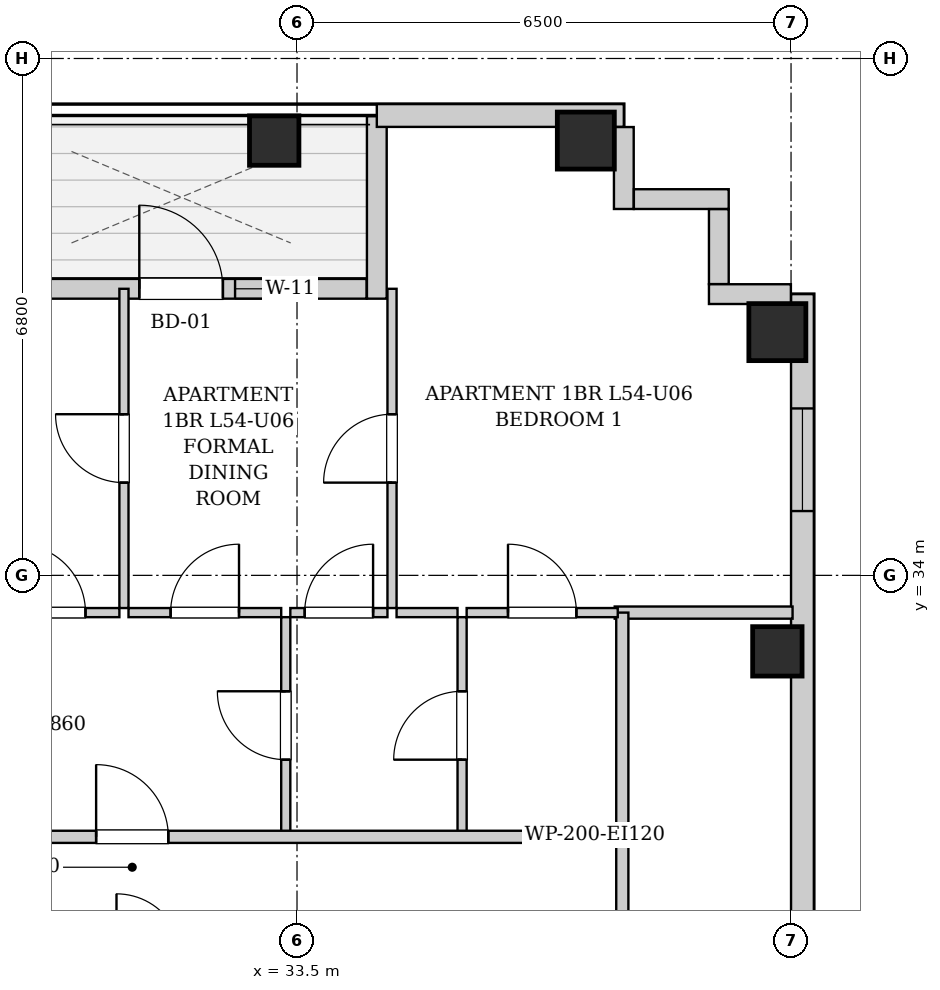
"""IFC4 building model, lengths in metres.
Left out: names, types, materials, properties, quantities, classifications, styles, units other than length and angle.
Written with IfcOpenShell. Run it as: python <this file> out.ifc"""

import sys

from ifc_helpers import new_model, si_unit, direction, frame, frame_2d, origin, origin_2d, place, context, subcontext, project, spatial, rectangle, extrude, element, fill, save


model = new_model("IFC4")
c1 = context("Model", 3, precision=1e-05, world=origin(), true_north=direction((0.0, 1.0)))
c2 = subcontext(c1, "Body", "Model", "MODEL_VIEW")
j1 = project(units=[si_unit("LENGTHUNIT", "METRE"), si_unit("PLANEANGLEUNIT", "RADIAN")], contexts=[c1])
p1 = place(None, origin())
s1 = spatial("IfcSite", under=j1, at=p1, CompositionType="ELEMENT")
p2 = place(p1, origin())
s2 = spatial("IfcBuilding", under=s1, at=p2, CompositionType="ELEMENT")
p3 = place(p2, frame((0.0, 0.0, 187.6)))
s3 = spatial("IfcBuildingStorey", under=s2, at=p3, CompositionType="ELEMENT", Elevation=187.6)
p4 = place(p3, frame((33.2, 39.72, 0.0), z_axis=(0.0, 0.0, 1.0), x_axis=(1.0, 0.0, 0.0)))
e1 = element("IfcColumn", 1, at=p4, inside=s3, PredefinedType="COLUMN", context=c2, shape_type="SweptSolid", body=[
    extrude(rectangle(XDim=0.65, YDim=0.65, at=origin_2d()), origin(), (0.0, 0.0, 1.0), 3.3),
])
p5 = place(p3, frame((37.3, 39.72, 0.0), z_axis=(0.0, 0.0, 1.0), x_axis=(1.0, 0.0, 0.0)))
e2 = element("IfcColumn", 2, at=p5, inside=s3, PredefinedType="COLUMN", context=c2, shape_type="SweptSolid", body=[
    extrude(rectangle(XDim=0.75, YDim=0.75, at=origin_2d()), origin(), (0.0, 0.0, 1.0), 3.3),
])
p6 = place(p3, frame((39.82, 33.0, 0.0), z_axis=(0.0, 0.0, 1.0), x_axis=(1.0, 0.0, 0.0)))
e3 = element("IfcColumn", 3, at=p6, inside=s3, PredefinedType="COLUMN", context=c2, shape_type="SweptSolid", body=[
    extrude(rectangle(XDim=0.65, YDim=0.65, at=origin_2d()), origin(), (0.0, 0.0, 1.0), 3.3),
])
p7 = place(p3, frame((39.82, 37.2, 0.0), z_axis=(0.0, 0.0, 1.0), x_axis=(1.0, 0.0, 0.0)))
e4 = element("IfcColumn", 4, at=p7, inside=s3, PredefinedType="COLUMN", context=c2, shape_type="SweptSolid", body=[
    extrude(rectangle(XDim=0.75, YDim=0.75, at=origin_2d()), origin(), (0.0, 0.0, 1.0), 3.3),
])
p8 = place(p3, frame((29.534, 37.77, 0.0), z_axis=(0.0, 0.0, 1.0), x_axis=(1.0, 0.0, 0.0)))
e5 = element("IfcWall", 5, at=p8, inside=s3, PredefinedType="SOLIDWALL", context=c2, shape_type="SweptSolid", body=[
    extrude(rectangle(XDim=4.882, YDim=0.26, at=frame_2d((2.441, 0.0))), origin(), (0.0, 0.0, 1.0), 3.04),
])
p9 = place(p8, frame((1.891, 0.0, 0.0)))
e6 = element("IfcOpeningElement", 6, at=p9, cuts=e5, PredefinedType="OPENING", context=c2, shape_type="SweptSolid", body=[
    extrude(rectangle(XDim=1.1, YDim=2.0, at=frame_2d((0.55, 1.0))), frame((0.0, 0.14, 0.0), z_axis=(0.0, -1.0, 0.0), x_axis=(1.0, 0.0, 0.0)), (0.0, 0.0, 1.0), 0.28),
])
p10 = place(p8, frame((3.151, 0.0, 0.55)))
e7 = element("IfcOpeningElement", 7, at=p10, cuts=e5, PredefinedType="OPENING", context=c2, shape_type="SweptSolid", body=[
    extrude(rectangle(XDim=0.85, YDim=1.2, at=frame_2d((0.425, 0.6))), frame((0.0, 0.14, 0.0), z_axis=(0.0, -1.0, 0.0), x_axis=(1.0, 0.0, 0.0)), (0.0, 0.0, 1.0), 0.28),
])
p11 = place(p3, frame((34.55, 37.64, 0.0), z_axis=(0.0, 0.0, 1.0), x_axis=(0.0, 1.0, 0.0)))
e8 = element("IfcWall", 8, at=p11, inside=s3, PredefinedType="SOLIDWALL", context=c2, shape_type="SweptSolid", body=[
    extrude(rectangle(XDim=2.4, YDim=0.26, at=frame_2d((1.2, 0.0))), origin(), (0.0, 0.0, 1.0), 3.04),
])
p12 = place(p3, frame((34.55, 40.05, 0.0), z_axis=(0.0, 0.0, 1.0), x_axis=(1.0, 0.0, 0.0)))
e9 = element("IfcWall", 9, at=p12, inside=s3, PredefinedType="SOLIDWALL", context=c2, shape_type="SweptSolid", body=[
    extrude(rectangle(XDim=3.25, YDim=0.3, at=frame_2d((1.625, 0.0))), origin(), (0.0, 0.0, 1.0), 3.04),
])
p13 = place(p3, frame((40.15, 37.7, 0.0), z_axis=(0.0, 0.0, 1.0), x_axis=(0.0, -1.0, 0.0)))
e10 = element("IfcWall", 10, at=p13, inside=s3, PredefinedType="SOLIDWALL", context=c2, shape_type="SweptSolid", body=[
    extrude(rectangle(XDim=31.4, YDim=0.3, at=frame_2d((15.7, 0.0))), origin(), (0.0, 0.0, 1.0), 3.04),
])
p14 = place(p13, frame((1.504, 0.0, 0.55)))
e11 = element("IfcOpeningElement", 11, at=p14, cuts=e10, PredefinedType="OPENING", context=c2, shape_type="SweptSolid", body=[
    extrude(rectangle(XDim=1.35, YDim=1.2, at=frame_2d((0.675, 0.6))), frame((0.0, 0.16, 0.0), z_axis=(0.0, -1.0, 0.0), x_axis=(1.0, 0.0, 0.0)), (0.0, 0.0, 1.0), 0.32),
])
p15 = place(p13, frame((18.2, 0.0, 0.55)))
e12 = element("IfcOpeningElement", 12, at=p15, cuts=e10, PredefinedType="OPENING", context=c2, shape_type="SweptSolid", body=[
    extrude(rectangle(XDim=1.35, YDim=1.2, at=frame_2d((0.675, 0.6))), frame((0.0, 0.16, 0.0), z_axis=(0.0, -1.0, 0.0), x_axis=(1.0, 0.0, 0.0)), (0.0, 0.0, 1.0), 0.32),
])
p16 = place(p13, frame((19.81, 0.0, 0.55)))
e13 = element("IfcOpeningElement", 13, at=p16, cuts=e10, PredefinedType="OPENING", context=c2, shape_type="SweptSolid", body=[
    extrude(rectangle(XDim=1.35, YDim=1.2, at=frame_2d((0.675, 0.6))), frame((0.0, 0.16, 0.0), z_axis=(0.0, -1.0, 0.0), x_axis=(1.0, 0.0, 0.0)), (0.0, 0.0, 1.0), 0.32),
])
p17 = place(p13, frame((11.043, 0.0, 0.55)))
e14 = element("IfcOpeningElement", 14, at=p17, cuts=e10, PredefinedType="OPENING", context=c2, shape_type="SweptSolid", body=[
    extrude(rectangle(XDim=1.35, YDim=1.2, at=frame_2d((0.675, 0.6))), frame((0.0, 0.16, 0.0), z_axis=(0.0, -1.0, 0.0), x_axis=(1.0, 0.0, 0.0)), (0.0, 0.0, 1.0), 0.32),
])
p18 = place(p13, frame((9.185, 0.0, 0.55)))
e15 = element("IfcOpeningElement", 15, at=p18, cuts=e10, PredefinedType="OPENING", context=c2, shape_type="SweptSolid", body=[
    extrude(rectangle(XDim=1.35, YDim=1.2, at=frame_2d((0.675, 0.6))), frame((0.0, 0.16, 0.0), z_axis=(0.0, -1.0, 0.0), x_axis=(1.0, 0.0, 0.0)), (0.0, 0.0, 1.0), 0.32),
])
p19 = place(p3, frame((37.8, 39.898, 0.0), z_axis=(0.0, 0.0, 1.0), x_axis=(0.0, -1.0, 0.0)))
e16 = element("IfcWall", 16, at=p19, inside=s3, PredefinedType="SOLIDWALL", context=c2, shape_type="SweptSolid", body=[
    extrude(rectangle(XDim=1.078, YDim=0.26, at=frame_2d((0.539, 0.0))), origin(), (0.0, 0.0, 1.0), 3.04),
])
p20 = place(p3, frame((37.932, 38.95, 0.0), z_axis=(0.0, 0.0, 1.0), x_axis=(1.0, 0.0, 0.0)))
e17 = element("IfcWall", 17, at=p20, inside=s3, PredefinedType="SOLIDWALL", context=c2, shape_type="SweptSolid", body=[
    extrude(rectangle(XDim=1.248, YDim=0.26, at=frame_2d((0.624, 0.0))), origin(), (0.0, 0.0, 1.0), 3.04),
])
p21 = place(p3, frame((39.05, 38.818, 0.0), z_axis=(0.0, 0.0, 1.0), x_axis=(0.0, -1.0, 0.0)))
e18 = element("IfcWall", 18, at=p21, inside=s3, PredefinedType="SOLIDWALL", context=c2, shape_type="SweptSolid", body=[
    extrude(rectangle(XDim=0.986, YDim=0.26, at=frame_2d((0.493, 0.0))), origin(), (0.0, 0.0, 1.0), 3.04),
])
p22 = place(p3, frame((38.92, 37.7, 0.0), z_axis=(0.0, 0.0, 1.0), x_axis=(1.0, 0.0, 0.0)))
e19 = element("IfcWall", 19, at=p22, inside=s3, PredefinedType="SOLIDWALL", context=c2, shape_type="SweptSolid", body=[
    extrude(rectangle(XDim=1.078, YDim=0.26, at=frame_2d((0.539, 0.0))), origin(), (0.0, 0.0, 1.0), 3.04),
])
p23 = place(p3, frame((37.78, 28.98, 0.0), z_axis=(0.0, 0.0, 1.0), x_axis=(0.0, 1.0, 0.0)))
e20 = element("IfcWall", 20, at=p23, inside=s3, PredefinedType="PARTITIONING", context=c2, shape_type="SweptSolid", body=[
    extrude(rectangle(XDim=1.58, YDim=0.16, at=frame_2d((0.79, 0.0))), origin(), (0.0, 0.0, 1.0), 3.04),
])
p24 = place(p3, frame((37.68, 33.51, 0.0), z_axis=(0.0, 0.0, 1.0), x_axis=(1.0, 0.0, 0.0)))
e21 = element("IfcWall", 21, at=p24, inside=s3, PredefinedType="PARTITIONING", context=c2, shape_type="SweptSolid", body=[
    extrude(rectangle(XDim=2.34, YDim=0.16, at=frame_2d((1.17, 0.0))), origin(), (0.0, 0.0, 1.0), 3.04),
])
p25 = place(p3, frame((37.78, 30.6, 0.0), z_axis=(0.0, 0.0, 1.0), x_axis=(0.0, 1.0, 0.0)))
e22 = element("IfcWall", 22, at=p25, inside=s3, PredefinedType="PARTITIONING", context=c2, shape_type="SweptSolid", body=[
    extrude(rectangle(XDim=2.91, YDim=0.16, at=frame_2d((1.455, 0.0))), origin(), (0.0, 0.0, 1.0), 3.04),
])
p26 = place(p3, frame((33.352, 30.6, 0.0), z_axis=(0.0, 0.0, 1.0), x_axis=(0.0, 1.0, 0.0)))
e23 = element("IfcWall", 23, at=p26, inside=s3, PredefinedType="PARTITIONING", context=c2, shape_type="SweptSolid", body=[
    extrude(rectangle(XDim=2.85, YDim=0.12, at=frame_2d((1.425, 0.0))), origin(), (0.0, 0.0, 1.0), 3.04),
])
p27 = place(p26, frame((0.975, 0.0, 0.0)))
e24 = element("IfcOpeningElement", 24, at=p27, cuts=e23, PredefinedType="OPENING", context=c2, shape_type="SweptSolid", body=[
    extrude(rectangle(XDim=0.9, YDim=2.05, at=frame_2d((0.45, 1.025))), frame((0.0, 0.07, 0.0), z_axis=(0.0, -1.0, 0.0), x_axis=(1.0, 0.0, 0.0)), (0.0, 0.0, 1.0), 0.14),
])
p28 = place(p3, frame((29.372, 33.51, 0.0), z_axis=(0.0, 0.0, 1.0), x_axis=(1.0, 0.0, 0.0)))
e25 = element("IfcWall", 25, at=p28, inside=s3, PredefinedType="PARTITIONING", context=c2, shape_type="SweptSolid", body=[
    extrude(rectangle(XDim=1.791, YDim=0.12, at=frame_2d((0.896, 0.0))), origin(), (0.0, 0.0, 1.0), 3.04),
])
p29 = place(p28, frame((0.445, 0.0, 0.0)))
e26 = element("IfcOpeningElement", 26, at=p29, cuts=e25, PredefinedType="OPENING", context=c2, shape_type="SweptSolid", body=[
    extrude(rectangle(XDim=0.9, YDim=2.05, at=frame_2d((0.45, 1.025))), frame((0.0, 0.07, 0.0), z_axis=(0.0, -1.0, 0.0), x_axis=(1.0, 0.0, 0.0)), (0.0, 0.0, 1.0), 0.14),
])
p30 = place(p3, frame((31.283, 33.51, 0.0), z_axis=(0.0, 0.0, 1.0), x_axis=(1.0, 0.0, 0.0)))
e27 = element("IfcWall", 27, at=p30, inside=s3, PredefinedType="PARTITIONING", context=c2, shape_type="SweptSolid", body=[
    extrude(rectangle(XDim=2.009, YDim=0.12, at=frame_2d((1.004, 0.0))), origin(), (0.0, 0.0, 1.0), 3.04),
])
p31 = place(p30, frame((0.554, 0.0, 0.0)))
e28 = element("IfcOpeningElement", 28, at=p31, cuts=e27, PredefinedType="OPENING", context=c2, shape_type="SweptSolid", body=[
    extrude(rectangle(XDim=0.9, YDim=2.05, at=frame_2d((0.45, 1.025))), frame((0.0, 0.07, 0.0), z_axis=(0.0, -1.0, 0.0), x_axis=(1.0, 0.0, 0.0)), (0.0, 0.0, 1.0), 0.14),
])
p32 = place(p3, frame((35.672, 30.6, 0.0), z_axis=(0.0, 0.0, 1.0), x_axis=(0.0, 1.0, 0.0)))
e29 = element("IfcWall", 29, at=p32, inside=s3, PredefinedType="PARTITIONING", context=c2, shape_type="SweptSolid", body=[
    extrude(rectangle(XDim=2.85, YDim=0.12, at=frame_2d((1.425, 0.0))), origin(), (0.0, 0.0, 1.0), 3.04),
])
p33 = place(p32, frame((0.975, 0.0, 0.0)))
e30 = element("IfcOpeningElement", 30, at=p33, cuts=e29, PredefinedType="OPENING", context=c2, shape_type="SweptSolid", body=[
    extrude(rectangle(XDim=0.9, YDim=2.05, at=frame_2d((0.45, 1.025))), frame((0.0, 0.07, 0.0), z_axis=(0.0, -1.0, 0.0), x_axis=(1.0, 0.0, 0.0)), (0.0, 0.0, 1.0), 0.14),
])
p34 = place(p3, frame((33.412, 33.51, 0.0), z_axis=(0.0, 0.0, 1.0), x_axis=(1.0, 0.0, 0.0)))
e31 = element("IfcWall", 31, at=p34, inside=s3, PredefinedType="PARTITIONING", context=c2, shape_type="SweptSolid", body=[
    extrude(rectangle(XDim=1.278, YDim=0.12, at=frame_2d((0.639, 0.0))), origin(), (0.0, 0.0, 1.0), 3.04),
])
p35 = place(p34, frame((0.189, 0.0, 0.0)))
e32 = element("IfcOpeningElement", 32, at=p35, cuts=e31, PredefinedType="OPENING", context=c2, shape_type="SweptSolid", body=[
    extrude(rectangle(XDim=0.9, YDim=2.05, at=frame_2d((0.45, 1.025))), frame((0.0, 0.07, 0.0), z_axis=(0.0, -1.0, 0.0), x_axis=(1.0, 0.0, 0.0)), (0.0, 0.0, 1.0), 0.14),
])
p36 = place(p3, frame((34.81, 33.51, 0.0), z_axis=(0.0, 0.0, 1.0), x_axis=(1.0, 0.0, 0.0)))
e33 = element("IfcWall", 33, at=p36, inside=s3, PredefinedType="PARTITIONING", context=c2, shape_type="SweptSolid", body=[
    extrude(rectangle(XDim=0.802, YDim=0.12, at=frame_2d((0.401, 0.0))), origin(), (0.0, 0.0, 1.0), 3.04),
])
p37 = place(p3, frame((35.732, 33.51, 0.0), z_axis=(0.0, 0.0, 1.0), x_axis=(1.0, 0.0, 0.0)))
e34 = element("IfcWall", 34, at=p37, inside=s3, PredefinedType="PARTITIONING", context=c2, shape_type="SweptSolid", body=[
    extrude(rectangle(XDim=1.988, YDim=0.12, at=frame_2d((0.994, 0.0))), origin(), (0.0, 0.0, 1.0), 3.04),
])
p38 = place(p37, frame((0.544, 0.0, 0.0)))
e35 = element("IfcOpeningElement", 35, at=p38, cuts=e34, PredefinedType="OPENING", context=c2, shape_type="SweptSolid", body=[
    extrude(rectangle(XDim=0.9, YDim=2.05, at=frame_2d((0.45, 1.025))), frame((0.0, 0.07, 0.0), z_axis=(0.0, -1.0, 0.0), x_axis=(1.0, 0.0, 0.0)), (0.0, 0.0, 1.0), 0.14),
])
p39 = place(p3, frame((31.223, 33.57, 0.0), z_axis=(0.0, 0.0, 1.0), x_axis=(0.0, 1.0, 0.0)))
e36 = element("IfcWall", 36, at=p39, inside=s3, PredefinedType="PARTITIONING", context=c2, shape_type="SweptSolid", body=[
    extrude(rectangle(XDim=4.2, YDim=0.12, at=frame_2d((2.1, 0.0))), origin(), (0.0, 0.0, 1.0), 3.04),
])
p40 = place(p39, frame((1.65, 0.0, 0.0)))
e37 = element("IfcOpeningElement", 37, at=p40, cuts=e36, PredefinedType="OPENING", context=c2, shape_type="SweptSolid", body=[
    extrude(rectangle(XDim=0.9, YDim=2.05, at=frame_2d((0.45, 1.025))), frame((0.0, 0.07, 0.0), z_axis=(0.0, -1.0, 0.0), x_axis=(1.0, 0.0, 0.0)), (0.0, 0.0, 1.0), 0.14),
])
p41 = place(p3, frame((34.75, 33.57, 0.0), z_axis=(0.0, 0.0, 1.0), x_axis=(0.0, 1.0, 0.0)))
e38 = element("IfcWall", 38, at=p41, inside=s3, PredefinedType="PARTITIONING", context=c2, shape_type="SweptSolid", body=[
    extrude(rectangle(XDim=4.2, YDim=0.12, at=frame_2d((2.1, 0.0))), origin(), (0.0, 0.0, 1.0), 3.04),
])
p42 = place(p41, frame((1.65, 0.0, 0.0)))
e39 = element("IfcOpeningElement", 39, at=p42, cuts=e38, PredefinedType="OPENING", context=c2, shape_type="SweptSolid", body=[
    extrude(rectangle(XDim=0.9, YDim=2.05, at=frame_2d((0.45, 1.025))), frame((0.0, 0.07, 0.0), z_axis=(0.0, -1.0, 0.0), x_axis=(1.0, 0.0, 0.0)), (0.0, 0.0, 1.0), 0.14),
])
p43 = place(p3, frame((13.15, 30.56, 0.0), z_axis=(0.0, 0.0, 1.0), x_axis=(1.0, 0.0, 0.0)))
e40 = element("IfcWall", 40, at=p43, inside=s3, PredefinedType="PARTITIONING", context=c2, shape_type="SweptSolid", body=[
    extrude(rectangle(XDim=24.6, YDim=0.16, at=frame_2d((12.3, 0.0))), origin(), (0.0, 0.0, 1.0), 3.04),
])
p44 = place(p43, frame((3.115, 0.0, 0.0)))
e41 = element("IfcOpeningElement", 41, at=p44, cuts=e40, PredefinedType="OPENING", context=c2, shape_type="SweptSolid", body=[
    extrude(rectangle(XDim=0.95, YDim=2.1, at=frame_2d((0.475, 1.05))), frame((0.0, 0.09, 0.0), z_axis=(0.0, -1.0, 0.0), x_axis=(1.0, 0.0, 0.0)), (0.0, 0.0, 1.0), 0.18),
])
p45 = place(p43, frame((11.489, 0.0, 0.0)))
e42 = element("IfcOpeningElement", 42, at=p45, cuts=e40, PredefinedType="OPENING", context=c2, shape_type="SweptSolid", body=[
    extrude(rectangle(XDim=0.95, YDim=2.1, at=frame_2d((0.475, 1.05))), frame((0.0, 0.09, 0.0), z_axis=(0.0, -1.0, 0.0), x_axis=(1.0, 0.0, 0.0)), (0.0, 0.0, 1.0), 0.18),
])
p46 = place(p43, frame((17.707, 0.0, 0.0)))
e43 = element("IfcOpeningElement", 43, at=p46, cuts=e40, PredefinedType="OPENING", context=c2, shape_type="SweptSolid", body=[
    extrude(rectangle(XDim=0.95, YDim=2.1, at=frame_2d((0.475, 1.05))), frame((0.0, 0.09, 0.0), z_axis=(0.0, -1.0, 0.0), x_axis=(1.0, 0.0, 0.0)), (0.0, 0.0, 1.0), 0.18),
])
p47 = place(p27, origin())
e44 = element("IfcDoor", 44, at=p47, inside=s3, OperationType="SINGLE_SWING_RIGHT", PredefinedType="DOOR", context=c2, shape_type="SweptSolid", body=[
    extrude(rectangle(XDim=0.9, YDim=2.05, at=frame_2d((0.45, 1.025))), frame((0.0, 0.025, 0.0), z_axis=(0.0, -1.0, 0.0), x_axis=(1.0, 0.0, 0.0)), (0.0, 0.0, 1.0), 0.05),
])
fill(e24, e44)
p48 = place(p29, origin())
e45 = element("IfcDoor", 45, at=p48, inside=s3, OperationType="SINGLE_SWING_LEFT", PredefinedType="DOOR", context=c2, shape_type="SweptSolid", body=[
    extrude(rectangle(XDim=0.9, YDim=2.05, at=frame_2d((0.45, 1.025))), frame((0.0, 0.025, 0.0), z_axis=(0.0, -1.0, 0.0), x_axis=(1.0, 0.0, 0.0)), (0.0, 0.0, 1.0), 0.05),
])
fill(e26, e45)
p49 = place(p31, origin())
e46 = element("IfcDoor", 46, at=p49, inside=s3, OperationType="SINGLE_SWING_RIGHT", PredefinedType="DOOR", context=c2, shape_type="SweptSolid", body=[
    extrude(rectangle(XDim=0.9, YDim=2.05, at=frame_2d((0.45, 1.025))), frame((0.0, 0.025, 0.0), z_axis=(0.0, -1.0, 0.0), x_axis=(1.0, 0.0, 0.0)), (0.0, 0.0, 1.0), 0.05),
])
fill(e28, e46)
p50 = place(p33, origin())
e47 = element("IfcDoor", 47, at=p50, inside=s3, OperationType="SINGLE_SWING_LEFT", PredefinedType="DOOR", context=c2, shape_type="SweptSolid", body=[
    extrude(rectangle(XDim=0.9, YDim=2.05, at=frame_2d((0.45, 1.025))), frame((0.0, 0.025, 0.0), z_axis=(0.0, -1.0, 0.0), x_axis=(1.0, 0.0, 0.0)), (0.0, 0.0, 1.0), 0.05),
])
fill(e30, e47)
p51 = place(p35, origin())
e48 = element("IfcDoor", 48, at=p51, inside=s3, OperationType="SINGLE_SWING_RIGHT", PredefinedType="DOOR", context=c2, shape_type="SweptSolid", body=[
    extrude(rectangle(XDim=0.9, YDim=2.05, at=frame_2d((0.45, 1.025))), frame((0.0, 0.025, 0.0), z_axis=(0.0, -1.0, 0.0), x_axis=(1.0, 0.0, 0.0)), (0.0, 0.0, 1.0), 0.05),
])
fill(e32, e48)
p52 = place(p38, origin())
e49 = element("IfcDoor", 49, at=p52, inside=s3, OperationType="SINGLE_SWING_LEFT", PredefinedType="DOOR", context=c2, shape_type="SweptSolid", body=[
    extrude(rectangle(XDim=0.9, YDim=2.05, at=frame_2d((0.45, 1.025))), frame((0.0, 0.025, 0.0), z_axis=(0.0, -1.0, 0.0), x_axis=(1.0, 0.0, 0.0)), (0.0, 0.0, 1.0), 0.05),
])
fill(e35, e49)
p53 = place(p40, origin())
e50 = element("IfcDoor", 50, at=p53, inside=s3, OperationType="SINGLE_SWING_RIGHT", PredefinedType="DOOR", context=c2, shape_type="SweptSolid", body=[
    extrude(rectangle(XDim=0.9, YDim=2.05, at=frame_2d((0.45, 1.025))), frame((0.0, 0.025, 0.0), z_axis=(0.0, -1.0, 0.0), x_axis=(1.0, 0.0, 0.0)), (0.0, 0.0, 1.0), 0.05),
])
fill(e37, e50)
p54 = place(p42, origin())
e51 = element("IfcDoor", 51, at=p54, inside=s3, OperationType="SINGLE_SWING_LEFT", PredefinedType="DOOR", context=c2, shape_type="SweptSolid", body=[
    extrude(rectangle(XDim=0.9, YDim=2.05, at=frame_2d((0.45, 1.025))), frame((0.0, 0.025, 0.0), z_axis=(0.0, -1.0, 0.0), x_axis=(1.0, 0.0, 0.0)), (0.0, 0.0, 1.0), 0.05),
])
fill(e39, e51)
p55 = place(p46, origin())
e52 = element("IfcDoor", 52, at=p55, inside=s3, OperationType="SINGLE_SWING_LEFT", PredefinedType="DOOR", context=c2, shape_type="SweptSolid", body=[
    extrude(rectangle(XDim=0.95, YDim=2.1, at=frame_2d((0.475, 1.05))), frame((0.0, 0.025, 0.0), z_axis=(0.0, -1.0, 0.0), x_axis=(1.0, 0.0, 0.0)), (0.0, 0.0, 1.0), 0.05),
])
fill(e43, e52)
p56 = place(p9, origin())
e53 = element("IfcDoor", 53, at=p56, inside=s3, OperationType="SINGLE_SWING_LEFT", PredefinedType="DOOR", context=c2, shape_type="SweptSolid", body=[
    extrude(rectangle(XDim=1.1, YDim=2.0, at=frame_2d((0.55, 1.0))), frame((0.0, 0.025, 0.0), z_axis=(0.0, -1.0, 0.0), x_axis=(1.0, 0.0, 0.0)), (0.0, 0.0, 1.0), 0.05),
])
fill(e6, e53)
p57 = place(p10, origin())
e54 = element("IfcWindow", 54, at=p57, inside=s3, PartitioningType="SINGLE_PANEL", PredefinedType="WINDOW", context=c2, shape_type="SweptSolid", body=[
    extrude(rectangle(XDim=0.85, YDim=1.2, at=frame_2d((0.425, 0.6))), frame((0.0, 0.03, 0.0), z_axis=(0.0, -1.0, 0.0), x_axis=(1.0, 0.0, 0.0)), (0.0, 0.0, 1.0), 0.06),
])
fill(e7, e54)
p58 = place(p14, origin())
e55 = element("IfcWindow", 55, at=p58, inside=s3, PartitioningType="SINGLE_PANEL", PredefinedType="WINDOW", context=c2, shape_type="SweptSolid", body=[
    extrude(rectangle(XDim=1.35, YDim=1.2, at=frame_2d((0.675, 0.6))), frame((0.0, 0.03, 0.0), z_axis=(0.0, -1.0, 0.0), x_axis=(1.0, 0.0, 0.0)), (0.0, 0.0, 1.0), 0.06),
])
fill(e11, e55)
save(model, sys.argv[1])
